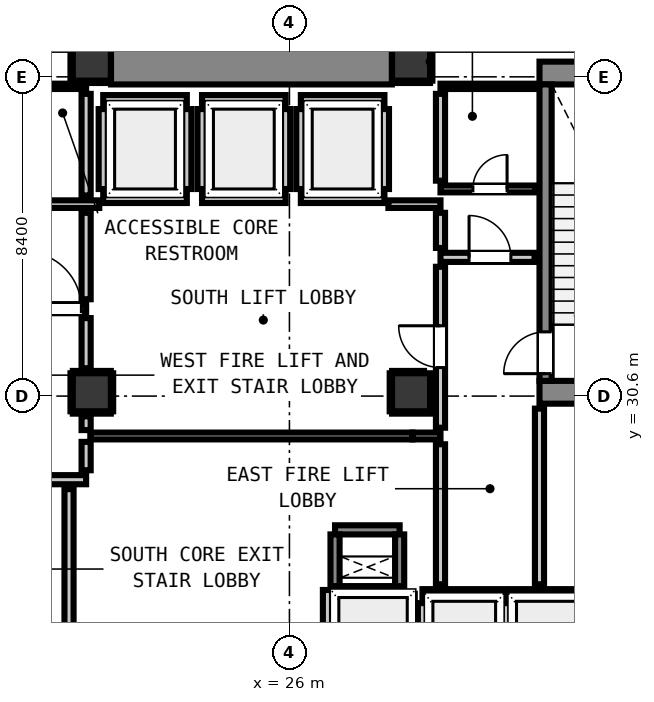
"""IFC4 building model, lengths in metres.
Left out: names, types, materials, properties, quantities, classifications, styles, units other than length and angle.
Written with IfcOpenShell. Run it as: python <this file> out.ifc"""

import sys

from ifc_helpers import new_model, si_unit, direction, frame, frame_2d, origin, origin_2d, place, context, subcontext, project, spatial, rectangle, extrude, element, fill, save


model = new_model("IFC4")
c1 = context("Model", 3, precision=1e-05, world=origin(), true_north=direction((0.0, 1.0)))
c2 = subcontext(c1, "Body", "Model", "MODEL_VIEW")
j1 = project(units=[si_unit("LENGTHUNIT", "METRE"), si_unit("PLANEANGLEUNIT", "RADIAN")], contexts=[c1])
p1 = place(None, origin())
s1 = spatial("IfcSite", under=j1, at=p1, CompositionType="ELEMENT")
p2 = place(p1, origin())
s2 = spatial("IfcBuilding", under=s1, at=p2, CompositionType="ELEMENT")
p3 = place(p2, frame((0.0, 0.0, -8.8)))
s3 = spatial("IfcBuildingStorey", under=s2, at=p3, CompositionType="ELEMENT", Elevation=-8.8)
for number, where, z_axis, x_axis in (
    (1, (20.8, 39.4, 0.0), (0.0, 0.0, 1.0), (1.0, 0.0, 0.0)),
    (2, (29.2, 39.4, 0.0), (0.0, 0.0, 1.0), (1.0, 0.0, 0.0)),
):
    element("IfcColumn", number, at=place(p3, frame(where, z_axis=z_axis, x_axis=x_axis)), inside=s3, PredefinedType="COLUMN", context=c2, shape_type="SweptSolid", body=[
        extrude(rectangle(XDim=1.0, YDim=1.0, at=origin_2d()), origin(), (0.0, 0.0, 1.0), 4.4),
    ])
p4 = place(p3, frame((32.58, 39.1, 0.0), z_axis=(0.0, 0.0, 1.0), x_axis=(1.0, 0.0, 0.0)))
e3 = element("IfcWall", 3, at=p4, inside=s3, PredefinedType="SHEAR", context=c2, shape_type="SweptSolid", body=[
    extrude(rectangle(XDim=4.08, YDim=0.6, at=frame_2d((2.04, 0.0))), origin(), (0.0, 0.0, 1.0), 4.4),
])
p5 = place(p3, frame((32.58, 30.7, 0.0), z_axis=(0.0, 0.0, 1.0), x_axis=(1.0, 0.0, 0.0)))
e4 = element("IfcWall", 4, at=p5, inside=s3, PredefinedType="SHEAR", context=c2, shape_type="SweptSolid", body=[
    extrude(rectangle(XDim=3.415, YDim=0.6, at=frame_2d((1.708, 0.0))), origin(), (0.0, 0.0, 1.0), 4.4),
])
p6 = place(p3, frame((21.305, 39.4, 0.0), z_axis=(0.0, 0.0, 1.0), x_axis=(1.0, 0.0, 0.0)))
e5 = element("IfcWall", 5, at=p6, inside=s3, PredefinedType="SHEAR", context=c2, shape_type="SweptSolid", body=[
    extrude(rectangle(XDim=7.39, YDim=1.2, at=frame_2d((3.695, 0.0))), origin(), (0.0, 0.0, 1.0), 4.4),
])
p7 = place(p3, frame((32.74, 31.0, 0.0), z_axis=(0.0, 0.0, 1.0), x_axis=(0.0, 1.0, 0.0)))
e6 = element("IfcWall", 6, at=p7, inside=s3, PredefinedType="SHEAR", context=c2, shape_type="SweptSolid", body=[
    extrude(rectangle(XDim=7.8, YDim=0.32, at=frame_2d((3.9, 0.0))), origin(), (0.0, 0.0, 1.0), 4.4),
])
p8 = place(p7, frame((0.19, 0.0, 0.0)))
e7 = element("IfcOpeningElement", 7, at=p8, cuts=e6, PredefinedType="OPENING", context=c2, shape_type="SweptSolid", body=[
    extrude(rectangle(XDim=1.1, YDim=2.15, at=frame_2d((0.55, 1.075))), frame((0.0, 0.17, 0.0), z_axis=(0.0, -1.0, 0.0), x_axis=(1.0, 0.0, 0.0)), (0.0, 0.0, 1.0), 0.34),
])
for number, where, z_axis, x_axis in (
    (8, (27.2, 25.48, 0.0), (0.0, 0.0, 1.0), (1.0, 0.0, 0.0)),
    (9, (27.2, 27.08, 0.0), (0.0, 0.0, 1.0), (1.0, 0.0, 0.0)),
):
    element("IfcWall", number, at=place(p3, frame(where, z_axis=z_axis, x_axis=x_axis)), inside=s3, PredefinedType="SHEAR", context=c2, shape_type="SweptSolid", body=[
        extrude(rectangle(XDim=1.7, YDim=0.24, at=frame_2d((0.85, 0.0))), origin(), (0.0, 0.0, 1.0), 4.4),
    ])
for number, where, z_axis, x_axis in (
    (10, (27.2, 25.6, 0.0), (0.0, 0.0, 1.0), (0.0, 1.0, 0.0)),
    (11, (28.9, 25.6, 0.0), (0.0, 0.0, 1.0), (0.0, 1.0, 0.0)),
):
    element("IfcWall", number, at=place(p3, frame(where, z_axis=z_axis, x_axis=x_axis)), inside=s3, PredefinedType="SHEAR", context=c2, shape_type="SweptSolid", body=[
        extrude(rectangle(XDim=1.36, YDim=0.24, at=frame_2d((0.68, 0.0))), origin(), (0.0, 0.0, 1.0), 4.4),
    ])
for number, where, z_axis, x_axis in (
    (12, (20.8, 30.7, 0.0), (0.0, 0.0, 1.0), (1.0, 0.0, 0.0)),
    (13, (29.2, 30.7, 0.0), (0.0, 0.0, 1.0), (1.0, 0.0, 0.0)),
):
    element("IfcColumn", number, at=place(p3, frame(where, z_axis=z_axis, x_axis=x_axis)), inside=s3, PredefinedType="COLUMN", context=c2, shape_type="SweptSolid", body=[
        extrude(rectangle(XDim=1.0, YDim=1.0, at=origin_2d()), origin(), (0.0, 0.0, 1.0), 4.4),
    ])
for number, where, z_axis, x_axis in (
    (14, (21.1, 35.8, 0.0), (0.0, 0.0, 1.0), (1.0, 0.0, 0.0)),
    (15, (21.1, 38.4, 0.0), (0.0, 0.0, 1.0), (1.0, 0.0, 0.0)),
):
    element("IfcWall", number, at=place(p3, frame(where, z_axis=z_axis, x_axis=x_axis)), inside=s3, PredefinedType="PARTITIONING", context=c2, shape_type="SweptSolid", body=[
        extrude(rectangle(XDim=2.2, YDim=0.24, at=frame_2d((1.1, 0.0))), origin(), (0.0, 0.0, 1.0), 4.1),
    ])
p9 = place(p3, frame((21.1, 36.048, 0.0), z_axis=(0.0, 0.0, 1.0), x_axis=(0.0, 1.0, 0.0)))
e16 = element("IfcWall", 16, at=p9, inside=s3, PredefinedType="PARTITIONING", context=c2, shape_type="SweptSolid", body=[
    extrude(rectangle(XDim=2.104, YDim=0.24, at=frame_2d((1.052, 0.0))), origin(), (0.0, 0.0, 1.0), 3.135),
])
p10 = place(p3, frame((23.3, 36.048, 0.0), z_axis=(0.0, 0.0, 1.0), x_axis=(0.0, 1.0, 0.0)))
e17 = element("IfcWall", 17, at=p10, inside=s3, PredefinedType="PARTITIONING", context=c2, shape_type="SweptSolid", body=[
    extrude(rectangle(XDim=2.104, YDim=0.24, at=frame_2d((1.052, 0.0))), origin(), (0.0, 0.0, 1.0), 4.1),
])
for number, where, z_axis, x_axis in (
    (18, (23.7, 35.8, 0.0), (0.0, 0.0, 1.0), (1.0, 0.0, 0.0)),
    (19, (23.7, 38.4, 0.0), (0.0, 0.0, 1.0), (1.0, 0.0, 0.0)),
):
    element("IfcWall", number, at=place(p3, frame(where, z_axis=z_axis, x_axis=x_axis)), inside=s3, PredefinedType="PARTITIONING", context=c2, shape_type="SweptSolid", body=[
        extrude(rectangle(XDim=2.2, YDim=0.24, at=frame_2d((1.1, 0.0))), origin(), (0.0, 0.0, 1.0), 4.1),
    ])
for number, where, z_axis, x_axis in (
    (20, (23.7, 36.048, 0.0), (0.0, 0.0, 1.0), (0.0, 1.0, 0.0)),
    (21, (25.9, 36.048, 0.0), (0.0, 0.0, 1.0), (0.0, 1.0, 0.0)),
):
    element("IfcWall", number, at=place(p3, frame(where, z_axis=z_axis, x_axis=x_axis)), inside=s3, PredefinedType="PARTITIONING", context=c2, shape_type="SweptSolid", body=[
        extrude(rectangle(XDim=2.104, YDim=0.24, at=frame_2d((1.052, 0.0))), origin(), (0.0, 0.0, 1.0), 4.1),
    ])
for number, where, z_axis, x_axis in (
    (22, (26.3, 35.8, 0.0), (0.0, 0.0, 1.0), (1.0, 0.0, 0.0)),
    (23, (26.3, 38.4, 0.0), (0.0, 0.0, 1.0), (1.0, 0.0, 0.0)),
):
    element("IfcWall", number, at=place(p3, frame(where, z_axis=z_axis, x_axis=x_axis)), inside=s3, PredefinedType="PARTITIONING", context=c2, shape_type="SweptSolid", body=[
        extrude(rectangle(XDim=2.2, YDim=0.24, at=frame_2d((1.1, 0.0))), origin(), (0.0, 0.0, 1.0), 4.1),
    ])
for number, where, z_axis, x_axis in (
    (24, (26.3, 36.048, 0.0), (0.0, 0.0, 1.0), (0.0, 1.0, 0.0)),
    (25, (28.5, 36.048, 0.0), (0.0, 0.0, 1.0), (0.0, 1.0, 0.0)),
):
    element("IfcWall", number, at=place(p3, frame(where, z_axis=z_axis, x_axis=x_axis)), inside=s3, PredefinedType="PARTITIONING", context=c2, shape_type="SweptSolid", body=[
        extrude(rectangle(XDim=2.104, YDim=0.24, at=frame_2d((1.052, 0.0))), origin(), (0.0, 0.0, 1.0), 4.1),
    ])
p11 = place(p3, frame((29.5, 25.4, 0.0), z_axis=(0.0, 0.0, 1.0), x_axis=(1.0, 0.0, 0.0)))
e26 = element("IfcWall", 26, at=p11, inside=s3, PredefinedType="PARTITIONING", context=c2, shape_type="SweptSolid", body=[
    extrude(rectangle(XDim=2.2, YDim=0.24, at=frame_2d((1.1, 0.0))), origin(), (0.0, 0.0, 1.0), 4.1),
])
p12 = place(p3, frame((29.5, 22.632, 0.0), z_axis=(0.0, 0.0, 1.0), x_axis=(0.0, 1.0, 0.0)))
e27 = element("IfcWall", 27, at=p12, inside=s3, PredefinedType="PARTITIONING", context=c2, shape_type="SweptSolid", body=[
    extrude(rectangle(XDim=2.52, YDim=0.24, at=frame_2d((1.26, 0.0))), origin(), (0.0, 0.0, 1.0), 3.135),
])
p13 = place(p3, frame((31.7, 22.73, 0.0), z_axis=(0.0, 0.0, 1.0), x_axis=(0.0, 1.0, 0.0)))
e28 = element("IfcWall", 28, at=p13, inside=s3, PredefinedType="PARTITIONING", context=c2, shape_type="SweptSolid", body=[
    extrude(rectangle(XDim=2.422, YDim=0.24, at=frame_2d((1.211, 0.0))), origin(), (0.0, 0.0, 1.0), 4.1),
])
p14 = place(p3, frame((31.828, 25.4, 0.0), z_axis=(0.0, 0.0, 1.0), x_axis=(1.0, 0.0, 0.0)))
e29 = element("IfcWall", 29, at=p14, inside=s3, PredefinedType="PARTITIONING", context=c2, shape_type="SweptSolid", body=[
    extrude(rectangle(XDim=2.072, YDim=0.24, at=frame_2d((1.036, 0.0))), origin(), (0.0, 0.0, 1.0), 4.1),
])
p15 = place(p3, frame((27.0, 22.73, 0.0), z_axis=(0.0, 0.0, 1.0), x_axis=(0.0, 1.0, 0.0)))
e30 = element("IfcWall", 30, at=p15, inside=s3, PredefinedType="PARTITIONING", context=c2, shape_type="SweptSolid", body=[
    extrude(rectangle(XDim=2.768, YDim=0.24, at=frame_2d((1.384, 0.0))), origin(), (0.0, 0.0, 1.0), 4.1),
])
p16 = place(p3, frame((17.45, 28.4, 0.0), z_axis=(0.0, 0.0, 1.0), x_axis=(1.0, 0.0, 0.0)))
e31 = element("IfcWall", 31, at=p16, inside=s3, PredefinedType="PARTITIONING", context=c2, shape_type="SweptSolid", body=[
    extrude(rectangle(XDim=3.2, YDim=0.24, at=frame_2d((1.6, 0.0))), origin(), (0.0, 0.0, 1.0), 4.1),
])
p17 = place(p16, frame((0.784, 0.0, 0.0)))
e32 = element("IfcOpeningElement", 32, at=p17, cuts=e31, PredefinedType="OPENING", context=c2, shape_type="SweptSolid", body=[
    extrude(rectangle(XDim=1.1, YDim=2.15, at=frame_2d((0.55, 1.075))), frame((0.0, 0.13, 0.0), z_axis=(0.0, -1.0, 0.0), x_axis=(1.0, 0.0, 0.0)), (0.0, 0.0, 1.0), 0.26),
])
p18 = place(p3, frame((17.45, 32.9, 0.0), z_axis=(0.0, 0.0, 1.0), x_axis=(1.0, 0.0, 0.0)))
e33 = element("IfcWall", 33, at=p18, inside=s3, PredefinedType="PARTITIONING", context=c2, shape_type="SweptSolid", body=[
    extrude(rectangle(XDim=3.2, YDim=0.24, at=frame_2d((1.6, 0.0))), origin(), (0.0, 0.0, 1.0), 4.1),
])
p19 = place(p18, frame((0.159, 0.0, 0.0)))
e34 = element("IfcOpeningElement", 34, at=p19, cuts=e33, PredefinedType="OPENING", context=c2, shape_type="SweptSolid", body=[
    extrude(rectangle(XDim=1.1, YDim=2.15, at=frame_2d((0.55, 1.075))), frame((0.0, 0.13, 0.0), z_axis=(0.0, -1.0, 0.0), x_axis=(1.0, 0.0, 0.0)), (0.0, 0.0, 1.0), 0.26),
])
p20 = place(p18, frame((1.576, 0.0, 0.0)))
e35 = element("IfcOpeningElement", 35, at=p20, cuts=e33, PredefinedType="OPENING", context=c2, shape_type="SweptSolid", body=[
    extrude(rectangle(XDim=1.5, YDim=2.15, at=frame_2d((0.75, 1.075))), frame((0.0, 0.13, 0.0), z_axis=(0.0, -1.0, 0.0), x_axis=(1.0, 0.0, 0.0)), (0.0, 0.0, 1.0), 0.26),
])
p21 = place(p3, frame((29.975, 34.25, 0.0), z_axis=(0.0, 0.0, 1.0), x_axis=(1.0, 0.0, 0.0)))
e36 = element("IfcWall", 36, at=p21, inside=s3, PredefinedType="PARTITIONING", context=c2, shape_type="SweptSolid", body=[
    extrude(rectangle(XDim=2.475, YDim=0.24, at=frame_2d((1.237, 0.0))), origin(), (0.0, 0.0, 1.0), 4.1),
])
p22 = place(p21, frame((0.752, 0.0, 0.0)))
e37 = element("IfcOpeningElement", 37, at=p22, cuts=e36, PredefinedType="OPENING", context=c2, shape_type="SweptSolid", body=[
    extrude(rectangle(XDim=1.1, YDim=2.15, at=frame_2d((0.55, 1.075))), frame((0.0, 0.13, 0.0), z_axis=(0.0, -1.0, 0.0), x_axis=(1.0, 0.0, 0.0)), (0.0, 0.0, 1.0), 0.26),
])
p23 = place(p3, frame((18.95, 35.65, 0.0), z_axis=(0.0, 0.0, 1.0), x_axis=(1.0, 0.0, 0.0)))
e38 = element("IfcWall", 38, at=p23, inside=s3, PredefinedType="PARTITIONING", context=c2, shape_type="SweptSolid", body=[
    extrude(rectangle(XDim=2.046, YDim=0.2, at=frame_2d((1.023, 0.0))), origin(), (0.0, 0.0, 1.0), 4.1),
])
p24 = place(p3, frame((28.604, 35.65, 0.0), z_axis=(0.0, 0.0, 1.0), x_axis=(1.0, 0.0, 0.0)))
e39 = element("IfcWall", 39, at=p24, inside=s3, PredefinedType="PARTITIONING", context=c2, shape_type="SweptSolid", body=[
    extrude(rectangle(XDim=1.371, YDim=0.2, at=frame_2d((0.686, 0.0))), origin(), (0.0, 0.0, 1.0), 4.1),
])
p25 = place(p3, frame((20.76, 29.55, 0.0), z_axis=(0.0, 0.0, 1.0), x_axis=(1.0, 0.0, 0.0)))
e40 = element("IfcWall", 40, at=p25, inside=s3, PredefinedType="PARTITIONING", context=c2, shape_type="SweptSolid", body=[
    extrude(rectangle(XDim=8.48, YDim=0.18, at=frame_2d((4.24, 0.0))), origin(), (0.0, 0.0, 1.0), 3.135),
])
p26 = place(p3, frame((29.24, 29.55, 0.0), z_axis=(0.0, 0.0, 1.0), x_axis=(1.0, 0.0, 0.0)))
e41 = element("IfcWall", 41, at=p26, inside=s3, PredefinedType="PARTITIONING", context=c2, shape_type="SweptSolid", body=[
    extrude(rectangle(XDim=0.735, YDim=0.18, at=frame_2d((0.368, 0.0))), origin(), (0.0, 0.0, 1.0), 4.1),
])
p27 = place(p3, frame((29.975, 36.05, 0.0), z_axis=(0.0, 0.0, 1.0), x_axis=(1.0, 0.0, 0.0)))
e42 = element("IfcWall", 42, at=p27, inside=s3, PredefinedType="PARTITIONING", context=c2, shape_type="SweptSolid", body=[
    extrude(rectangle(XDim=2.505, YDim=0.18, at=frame_2d((1.252, 0.0))), origin(), (0.0, 0.0, 1.0), 4.1),
])
p28 = place(p27, frame((0.852, 0.0, 0.0)))
e43 = element("IfcOpeningElement", 43, at=p28, cuts=e42, PredefinedType="OPENING", context=c2, shape_type="SweptSolid", body=[
    extrude(rectangle(XDim=0.9, YDim=2.1, at=frame_2d((0.45, 1.05))), frame((0.0, 0.1, 0.0), z_axis=(0.0, -1.0, 0.0), x_axis=(1.0, 0.0, 0.0)), (0.0, 0.0, 1.0), 0.2),
])
p29 = place(p3, frame((18.95, 38.75, 0.0), z_axis=(0.0, 0.0, 1.0), x_axis=(1.0, 0.0, 0.0)))
e44 = element("IfcWall", 44, at=p29, inside=s3, PredefinedType="PARTITIONING", context=c2, shape_type="SweptSolid", body=[
    extrude(rectangle(XDim=1.7, YDim=0.14, at=frame_2d((0.85, 0.0))), origin(), (0.0, 0.0, 1.0), 4.1),
])
p30 = place(p3, frame((29.975, 38.75, 0.0), z_axis=(0.0, 0.0, 1.0), x_axis=(1.0, 0.0, 0.0)))
e45 = element("IfcWall", 45, at=p30, inside=s3, PredefinedType="PARTITIONING", context=c2, shape_type="SweptSolid", body=[
    extrude(rectangle(XDim=2.525, YDim=0.14, at=frame_2d((1.262, 0.0))), origin(), (0.0, 0.0, 1.0), 4.1),
])
p31 = place(p3, frame((20.2, 22.586, 0.0), z_axis=(0.0, 0.0, 1.0), x_axis=(0.0, 1.0, 0.0)))
e46 = element("IfcWall", 46, at=p31, inside=s3, PredefinedType="PARTITIONING", context=c2, shape_type="SweptSolid", body=[
    extrude(rectangle(XDim=5.566, YDim=0.24, at=frame_2d((2.783, 0.0))), origin(), (0.0, 0.0, 1.0), 4.1),
])
p32 = place(p3, frame((20.65, 28.648, 0.0), z_axis=(0.0, 0.0, 1.0), x_axis=(0.0, 1.0, 0.0)))
e47 = element("IfcWall", 47, at=p32, inside=s3, PredefinedType="PARTITIONING", context=c2, shape_type="SweptSolid", body=[
    extrude(rectangle(XDim=0.747, YDim=0.24, at=frame_2d((0.374, 0.0))), origin(), (0.0, 0.0, 1.0), 3.135),
])
p33 = place(p3, frame((20.65, 29.705, 0.0), z_axis=(0.0, 0.0, 1.0), x_axis=(0.0, 1.0, 0.0)))
e48 = element("IfcWall", 48, at=p33, inside=s3, PredefinedType="PARTITIONING", context=c2, shape_type="SweptSolid", body=[
    extrude(rectangle(XDim=0.363, YDim=0.24, at=frame_2d((0.182, 0.0))), origin(), (0.0, 0.0, 1.0), 3.135),
])
p34 = place(p3, frame((20.65, 31.332, 0.0), z_axis=(0.0, 0.0, 1.0), x_axis=(0.0, 1.0, 0.0)))
e49 = element("IfcWall", 49, at=p34, inside=s3, PredefinedType="PARTITIONING", context=c2, shape_type="SweptSolid", body=[
    extrude(rectangle(XDim=1.32, YDim=0.24, at=frame_2d((0.66, 0.0))), origin(), (0.0, 0.0, 1.0), 3.135),
])
p35 = place(p3, frame((20.65, 33.148, 0.0), z_axis=(0.0, 0.0, 1.0), x_axis=(0.0, 1.0, 0.0)))
e50 = element("IfcWall", 50, at=p35, inside=s3, PredefinedType="PARTITIONING", context=c2, shape_type="SweptSolid", body=[
    extrude(rectangle(XDim=2.274, YDim=0.24, at=frame_2d((1.137, 0.0))), origin(), (0.0, 0.0, 1.0), 3.135),
])
p36 = place(p3, frame((20.65, 35.878, 0.0), z_axis=(0.0, 0.0, 1.0), x_axis=(0.0, 1.0, 0.0)))
e51 = element("IfcWall", 51, at=p36, inside=s3, PredefinedType="PARTITIONING", context=c2, shape_type="SweptSolid", body=[
    extrude(rectangle(XDim=2.674, YDim=0.24, at=frame_2d((1.337, 0.0))), origin(), (0.0, 0.0, 1.0), 3.135),
])
p37 = place(p3, frame((29.975, 25.648, 0.0), z_axis=(0.0, 0.0, 1.0), x_axis=(0.0, 1.0, 0.0)))
e52 = element("IfcWall", 52, at=p37, inside=s3, PredefinedType="PARTITIONING", context=c2, shape_type="SweptSolid", body=[
    extrude(rectangle(XDim=3.684, YDim=0.24, at=frame_2d((1.842, 0.0))), origin(), (0.0, 0.0, 1.0), 4.1),
])
p38 = place(p3, frame((29.975, 29.768, 0.0), z_axis=(0.0, 0.0, 1.0), x_axis=(0.0, 1.0, 0.0)))
e53 = element("IfcWall", 53, at=p38, inside=s3, PredefinedType="PARTITIONING", context=c2, shape_type="SweptSolid", body=[
    extrude(rectangle(XDim=4.234, YDim=0.24, at=frame_2d((2.117, 0.0))), origin(), (0.0, 0.0, 1.0), 4.1),
])
p39 = place(p38, frame((1.582, 0.0, 0.0)))
e54 = element("IfcOpeningElement", 54, at=p39, cuts=e53, PredefinedType="OPENING", context=c2, shape_type="SweptSolid", body=[
    extrude(rectangle(XDim=1.1, YDim=2.15, at=frame_2d((0.55, 1.075))), frame((0.0, 0.13, 0.0), z_axis=(0.0, -1.0, 0.0), x_axis=(1.0, 0.0, 0.0)), (0.0, 0.0, 1.0), 0.26),
])
p40 = place(p3, frame((29.975, 34.498, 0.0), z_axis=(0.0, 0.0, 1.0), x_axis=(0.0, 1.0, 0.0)))
e55 = element("IfcWall", 55, at=p40, inside=s3, PredefinedType="PARTITIONING", context=c2, shape_type="SweptSolid", body=[
    extrude(rectangle(XDim=0.924, YDim=0.24, at=frame_2d((0.462, 0.0))), origin(), (0.0, 0.0, 1.0), 4.1),
])
p41 = place(p3, frame((29.975, 36.268, 0.0), z_axis=(0.0, 0.0, 1.0), x_axis=(0.0, 1.0, 0.0)))
e56 = element("IfcWall", 56, at=p41, inside=s3, PredefinedType="PARTITIONING", context=c2, shape_type="SweptSolid", body=[
    extrude(rectangle(XDim=2.284, YDim=0.24, at=frame_2d((1.142, 0.0))), origin(), (0.0, 0.0, 1.0), 4.1),
])
p42 = place(p3, frame((32.58, 25.648, 0.0), z_axis=(0.0, 0.0, 1.0), x_axis=(0.0, 1.0, 0.0)))
e57 = element("IfcWall", 57, at=p42, inside=s3, PredefinedType="PARTITIONING", context=c2, shape_type="SweptSolid", body=[
    extrude(rectangle(XDim=4.622, YDim=0.24, at=frame_2d((2.311, 0.0))), origin(), (0.0, 0.0, 1.0), 4.1),
])
p43 = place(p3, frame((20.3, 38.868, 0.0), z_axis=(0.0, 0.0, 1.0), x_axis=(1.0, 0.0, 0.0)))
e58 = element("IfcWall", 58, at=p43, inside=s3, PredefinedType="PARTITIONING", context=c2, shape_type="SweptSolid", body=[
    extrude(rectangle(XDim=0.99, YDim=0.06, at=frame_2d((0.495, 0.0))), origin(), (0.0, 0.0, 1.0), 1.45),
])
p44 = place(p3, frame((20.268, 38.9, 0.0), z_axis=(0.0, 0.0, 1.0), x_axis=(0.0, 1.0, 0.0)))
e59 = element("IfcWall", 59, at=p44, inside=s3, PredefinedType="PARTITIONING", context=c2, shape_type="SweptSolid", body=[
    extrude(rectangle(XDim=1.0, YDim=0.06, at=frame_2d((0.5, 0.0))), origin(), (0.0, 0.0, 1.0), 1.45),
])
p45 = place(p3, frame((28.71, 38.868, 0.0), z_axis=(0.0, 0.0, 1.0), x_axis=(1.0, 0.0, 0.0)))
e60 = element("IfcWall", 60, at=p45, inside=s3, PredefinedType="PARTITIONING", context=c2, shape_type="SweptSolid", body=[
    extrude(rectangle(XDim=0.99, YDim=0.06, at=frame_2d((0.495, 0.0))), origin(), (0.0, 0.0, 1.0), 1.45),
])
for number, where, z_axis, x_axis in (
    (61, (29.732, 38.9, 0.0), (0.0, 0.0, 1.0), (0.0, 1.0, 0.0)),
    (62, (20.3, 30.168, 0.0), (0.0, 0.0, 1.0), (1.0, 0.0, 0.0)),
    (63, (20.3, 31.232, 0.0), (0.0, 0.0, 1.0), (1.0, 0.0, 0.0)),
    (64, (20.268, 30.2, 0.0), (0.0, 0.0, 1.0), (0.0, 1.0, 0.0)),
    (65, (21.332, 30.2, 0.0), (0.0, 0.0, 1.0), (0.0, 1.0, 0.0)),
    (66, (28.7, 30.168, 0.0), (0.0, 0.0, 1.0), (1.0, 0.0, 0.0)),
):
    element("IfcWall", number, at=place(p3, frame(where, z_axis=z_axis, x_axis=x_axis)), inside=s3, PredefinedType="PARTITIONING", context=c2, shape_type="SweptSolid", body=[
        extrude(rectangle(XDim=1.0, YDim=0.06, at=frame_2d((0.5, 0.0))), origin(), (0.0, 0.0, 1.0), 1.45),
    ])
p46 = place(p3, frame((28.7, 31.232, 0.0), z_axis=(0.0, 0.0, 1.0), x_axis=(1.0, 0.0, 0.0)))
e67 = element("IfcWall", 67, at=p46, inside=s3, PredefinedType="PARTITIONING", context=c2, shape_type="SweptSolid", body=[
    extrude(rectangle(XDim=0.841, YDim=0.06, at=frame_2d((0.42, 0.0))), origin(), (0.0, 0.0, 1.0), 1.45),
])
p47 = place(p3, frame((28.668, 30.2, 0.0), z_axis=(0.0, 0.0, 1.0), x_axis=(0.0, 1.0, 0.0)))
e68 = element("IfcWall", 68, at=p47, inside=s3, PredefinedType="PARTITIONING", context=c2, shape_type="SweptSolid", body=[
    extrude(rectangle(XDim=1.0, YDim=0.06, at=frame_2d((0.5, 0.0))), origin(), (0.0, 0.0, 1.0), 1.45),
])
p48 = place(p3, frame((29.732, 30.2, 0.0), z_axis=(0.0, 0.0, 1.0), x_axis=(0.0, 1.0, 0.0)))
e69 = element("IfcWall", 69, at=p48, inside=s3, PredefinedType="PARTITIONING", context=c2, shape_type="SweptSolid", body=[
    extrude(rectangle(XDim=0.772, YDim=0.06, at=frame_2d((0.386, 0.0))), origin(), (0.0, 0.0, 1.0), 1.45),
])
p49 = place(p8, origin())
e70 = element("IfcDoor", 70, at=p49, inside=s3, OperationType="SINGLE_SWING_LEFT", PredefinedType="DOOR", context=c2, shape_type="SweptSolid", body=[
    extrude(rectangle(XDim=1.1, YDim=2.15, at=frame_2d((0.55, 1.075))), frame((0.0, 0.025, 0.0), z_axis=(0.0, -1.0, 0.0), x_axis=(1.0, 0.0, 0.0)), (0.0, 0.0, 1.0), 0.05),
])
fill(e7, e70)
p50 = place(p39, origin())
e71 = element("IfcDoor", 71, at=p50, inside=s3, OperationType="SINGLE_SWING_RIGHT", PredefinedType="DOOR", context=c2, shape_type="SweptSolid", body=[
    extrude(rectangle(XDim=1.1, YDim=2.15, at=frame_2d((0.55, 1.075))), frame((0.0, 0.025, 0.0), z_axis=(0.0, -1.0, 0.0), x_axis=(1.0, 0.0, 0.0)), (0.0, 0.0, 1.0), 0.05),
])
fill(e54, e71)
p51 = place(p22, origin())
e72 = element("IfcDoor", 72, at=p51, inside=s3, OperationType="SINGLE_SWING_LEFT", PredefinedType="DOOR", context=c2, shape_type="SweptSolid", body=[
    extrude(rectangle(XDim=1.1, YDim=2.15, at=frame_2d((0.55, 1.075))), frame((0.0, 0.025, 0.0), z_axis=(0.0, -1.0, 0.0), x_axis=(1.0, 0.0, 0.0)), (0.0, 0.0, 1.0), 0.05),
])
fill(e37, e72)
p52 = place(p20, origin())
e73 = element("IfcDoor", 73, at=p52, inside=s3, OperationType="SINGLE_SWING_LEFT", PredefinedType="DOOR", context=c2, shape_type="SweptSolid", body=[
    extrude(rectangle(XDim=1.5, YDim=2.15, at=frame_2d((0.75, 1.075))), frame((0.0, 0.025, 0.0), z_axis=(0.0, -1.0, 0.0), x_axis=(1.0, 0.0, 0.0)), (0.0, 0.0, 1.0), 0.05),
])
fill(e35, e73)
p53 = place(p28, origin())
e74 = element("IfcDoor", 74, at=p53, inside=s3, OperationType="SINGLE_SWING_RIGHT", PredefinedType="DOOR", context=c2, shape_type="SweptSolid", body=[
    extrude(rectangle(XDim=0.9, YDim=2.1, at=frame_2d((0.45, 1.05))), frame((0.0, 0.025, 0.0), z_axis=(0.0, -1.0, 0.0), x_axis=(1.0, 0.0, 0.0)), (0.0, 0.0, 1.0), 0.05),
])
fill(e43, e74)
save(model, sys.argv[1])
